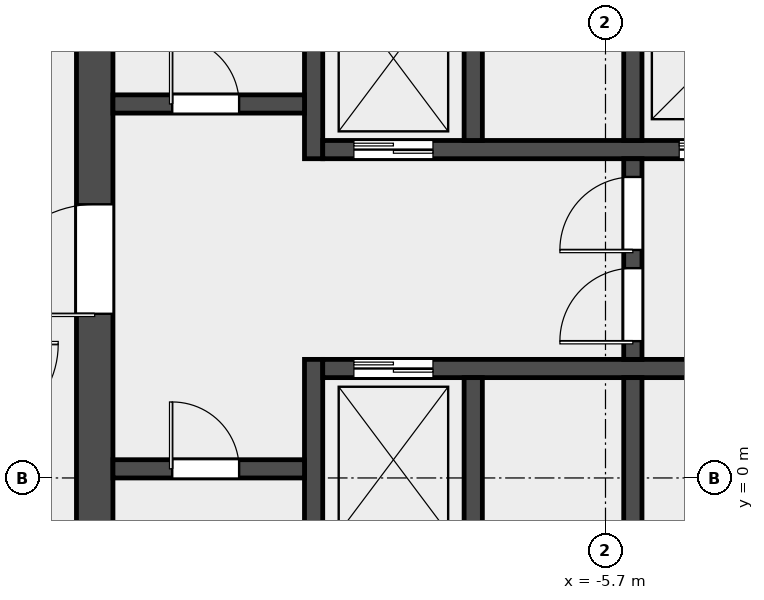
"""IFC4 building model, lengths in metres.
Left out: names, types, materials, properties, quantities, classifications, styles, units other than length and angle.
Written with IfcOpenShell. Run it as: python <this file> out.ifc"""

import sys

from ifc_helpers import new_model, si_unit, direction, frame, frame_2d, origin, place, context, subcontext, project, spatial, rectangle, extrude, element, fill, save


model = new_model("IFC4")
c1 = context("Model", 3, precision=1e-05, world=origin(), true_north=direction((0.0, 1.0)))
c2 = subcontext(c1, "Body", "Model", "MODEL_VIEW")
j1 = project(units=[si_unit("LENGTHUNIT", "METRE"), si_unit("PLANEANGLEUNIT", "RADIAN")], contexts=[c1])
p1 = place(None, origin())
s1 = spatial("IfcSite", under=j1, at=p1, CompositionType="ELEMENT")
p2 = place(p1, origin())
s2 = spatial("IfcBuilding", under=s1, at=p2, CompositionType="ELEMENT")
p3 = place(p2, frame((0.0, 0.0, 307.4)))
s3 = spatial("IfcBuildingStorey", under=s2, at=p3, CompositionType="ELEMENT", Elevation=307.4)
p4 = place(p3, frame((-14.1, -6.6, 0.0), z_axis=(0.0, 0.0, 1.0), x_axis=(0.0, 1.0, 0.0)))
e1 = element("IfcWall", 1, at=p4, inside=s3, PredefinedType="SHEAR", context=c2, shape_type="SweptSolid", body=[
    extrude(rectangle(XDim=19.5, YDim=0.6, at=frame_2d((9.75, 0.0))), origin(), (0.0, 0.0, 1.0), 3.7),
])
p5 = place(p4, frame((9.3, 0.0, 0.0)))
e2 = element("IfcOpeningElement", 2, at=p5, cuts=e1, PredefinedType="OPENING", context=c2, shape_type="SweptSolid", body=[
    extrude(rectangle(XDim=1.8, YDim=2.1, at=frame_2d((0.9, 1.05))), frame((0.0, 0.312, 0.0), z_axis=(0.0, -1.0, 0.0), x_axis=(1.0, 0.0, 0.0)), (0.0, 0.0, 1.0), 0.624),
])
p6 = place(p3, frame((-10.5, -6.6, 0.0), z_axis=(0.0, 0.0, 1.0), x_axis=(0.0, 1.0, 0.0)))
e3 = element("IfcWall", 3, at=p6, inside=s3, PredefinedType="SHEAR", context=c2, shape_type="SweptSolid", body=[
    extrude(rectangle(XDim=8.55, YDim=0.3, at=frame_2d((4.275, 0.0))), origin(), (0.0, 0.0, 1.0), 3.7),
])
p7 = place(p3, frame((-10.5, 5.25, 0.0), z_axis=(0.0, 0.0, 1.0), x_axis=(0.0, 1.0, 0.0)))
e4 = element("IfcWall", 4, at=p7, inside=s3, PredefinedType="SHEAR", context=c2, shape_type="SweptSolid", body=[
    extrude(rectangle(XDim=7.65, YDim=0.3, at=frame_2d((3.825, 0.0))), origin(), (0.0, 0.0, 1.0), 3.7),
])
p8 = place(p3, frame((-13.8, 0.15, 0.0), z_axis=(0.0, 0.0, 1.0), x_axis=(1.0, 0.0, 0.0)))
e5 = element("IfcWall", 5, at=p8, inside=s3, PredefinedType="SOLIDWALL", context=c2, shape_type="SweptSolid", body=[
    extrude(rectangle(XDim=3.15, YDim=0.3, at=frame_2d((1.575, 0.0))), origin(), (0.0, 0.0, 1.0), 3.7),
])
p9 = place(p8, frame((0.975, 0.0, 0.0)))
e6 = element("IfcOpeningElement", 6, at=p9, cuts=e5, PredefinedType="OPENING", context=c2, shape_type="SweptSolid", body=[
    extrude(rectangle(XDim=1.1, YDim=2.1, at=frame_2d((0.55, 1.05))), frame((0.0, 0.162, 0.0), z_axis=(0.0, -1.0, 0.0), x_axis=(1.0, 0.0, 0.0)), (0.0, 0.0, 1.0), 0.324),
])
p10 = place(p3, frame((-13.8, 6.15, 0.0), z_axis=(0.0, 0.0, 1.0), x_axis=(1.0, 0.0, 0.0)))
e7 = element("IfcWall", 7, at=p10, inside=s3, PredefinedType="SOLIDWALL", context=c2, shape_type="SweptSolid", body=[
    extrude(rectangle(XDim=3.15, YDim=0.3, at=frame_2d((1.575, 0.0))), origin(), (0.0, 0.0, 1.0), 3.7),
])
p11 = place(p10, frame((0.975, 0.0, 0.0)))
e8 = element("IfcOpeningElement", 8, at=p11, cuts=e7, PredefinedType="OPENING", context=c2, shape_type="SweptSolid", body=[
    extrude(rectangle(XDim=1.1, YDim=2.1, at=frame_2d((0.55, 1.05))), frame((0.0, 0.162, 0.0), z_axis=(0.0, -1.0, 0.0), x_axis=(1.0, 0.0, 0.0)), (0.0, 0.0, 1.0), 0.324),
])
p12 = place(p3, frame((-10.35, 1.8, 0.0), z_axis=(0.0, 0.0, 1.0), x_axis=(1.0, 0.0, 0.0)))
e9 = element("IfcWall", 9, at=p12, inside=s3, PredefinedType="SOLIDWALL", context=c2, shape_type="SweptSolid", body=[
    extrude(rectangle(XDim=20.7, YDim=0.3, at=frame_2d((10.35, 0.0))), origin(), (0.0, 0.0, 1.0), 3.7),
])
p13 = place(p12, frame((0.512, 0.0, 0.0)))
e10 = element("IfcOpeningElement", 10, at=p13, cuts=e9, PredefinedType="OPENING", context=c2, shape_type="SweptSolid", body=[
    extrude(rectangle(XDim=1.3, YDim=2.1, at=frame_2d((0.65, 1.05))), frame((0.0, 0.162, 0.0), z_axis=(0.0, -1.0, 0.0), x_axis=(1.0, 0.0, 0.0)), (0.0, 0.0, 1.0), 0.324),
])
p14 = place(p12, frame((7.225, 0.0, 0.0)))
e11 = element("IfcOpeningElement", 11, at=p14, cuts=e9, PredefinedType="OPENING", context=c2, shape_type="SweptSolid", body=[
    extrude(rectangle(XDim=1.0, YDim=2.1, at=frame_2d((0.5, 1.05))), frame((0.0, 0.162, 0.0), z_axis=(0.0, -1.0, 0.0), x_axis=(1.0, 0.0, 0.0)), (0.0, 0.0, 1.0), 0.324),
])
p15 = place(p12, frame((11.163, 0.0, 0.0)))
e12 = element("IfcOpeningElement", 12, at=p15, cuts=e9, PredefinedType="OPENING", context=c2, shape_type="SweptSolid", body=[
    extrude(rectangle(XDim=1.0, YDim=2.1, at=frame_2d((0.5, 1.05))), frame((0.0, 0.162, 0.0), z_axis=(0.0, -1.0, 0.0), x_axis=(1.0, 0.0, 0.0)), (0.0, 0.0, 1.0), 0.324),
])
p16 = place(p12, frame((16.413, 0.0, 0.0)))
e13 = element("IfcOpeningElement", 13, at=p16, cuts=e9, PredefinedType="OPENING", context=c2, shape_type="SweptSolid", body=[
    extrude(rectangle(XDim=1.0, YDim=2.1, at=frame_2d((0.5, 1.05))), frame((0.0, 0.162, 0.0), z_axis=(0.0, -1.0, 0.0), x_axis=(1.0, 0.0, 0.0)), (0.0, 0.0, 1.0), 0.324),
])
p17 = place(p3, frame((-10.35, 5.4, 0.0), z_axis=(0.0, 0.0, 1.0), x_axis=(1.0, 0.0, 0.0)))
e14 = element("IfcWall", 14, at=p17, inside=s3, PredefinedType="SOLIDWALL", context=c2, shape_type="SweptSolid", body=[
    extrude(rectangle(XDim=20.7, YDim=0.3, at=frame_2d((10.35, 0.0))), origin(), (0.0, 0.0, 1.0), 3.7),
])
p18 = place(p17, frame((0.512, 0.0, 0.0)))
e15 = element("IfcOpeningElement", 15, at=p18, cuts=e14, PredefinedType="OPENING", context=c2, shape_type="SweptSolid", body=[
    extrude(rectangle(XDim=1.3, YDim=2.1, at=frame_2d((0.65, 1.05))), frame((0.0, 0.162, 0.0), z_axis=(0.0, -1.0, 0.0), x_axis=(1.0, 0.0, 0.0)), (0.0, 0.0, 1.0), 0.324),
])
p19 = place(p17, frame((5.863, 0.0, 0.0)))
e16 = element("IfcOpeningElement", 16, at=p19, cuts=e14, PredefinedType="OPENING", context=c2, shape_type="SweptSolid", body=[
    extrude(rectangle(XDim=1.1, YDim=2.1, at=frame_2d((0.55, 1.05))), frame((0.0, 0.162, 0.0), z_axis=(0.0, -1.0, 0.0), x_axis=(1.0, 0.0, 0.0)), (0.0, 0.0, 1.0), 0.324),
])
p20 = place(p17, frame((8.488, 0.0, 0.0)))
e17 = element("IfcOpeningElement", 17, at=p20, cuts=e14, PredefinedType="OPENING", context=c2, shape_type="SweptSolid", body=[
    extrude(rectangle(XDim=1.1, YDim=2.1, at=frame_2d((0.55, 1.05))), frame((0.0, 0.162, 0.0), z_axis=(0.0, -1.0, 0.0), x_axis=(1.0, 0.0, 0.0)), (0.0, 0.0, 1.0), 0.324),
])
p21 = place(p17, frame((11.113, 0.0, 0.0)))
e18 = element("IfcOpeningElement", 18, at=p21, cuts=e14, PredefinedType="OPENING", context=c2, shape_type="SweptSolid", body=[
    extrude(rectangle(XDim=1.1, YDim=2.1, at=frame_2d((0.55, 1.05))), frame((0.0, 0.162, 0.0), z_axis=(0.0, -1.0, 0.0), x_axis=(1.0, 0.0, 0.0)), (0.0, 0.0, 1.0), 0.324),
])
p22 = place(p17, frame((13.738, 0.0, 0.0)))
e19 = element("IfcOpeningElement", 19, at=p22, cuts=e14, PredefinedType="OPENING", context=c2, shape_type="SweptSolid", body=[
    extrude(rectangle(XDim=1.1, YDim=2.1, at=frame_2d((0.55, 1.05))), frame((0.0, 0.162, 0.0), z_axis=(0.0, -1.0, 0.0), x_axis=(1.0, 0.0, 0.0)), (0.0, 0.0, 1.0), 0.324),
])
p23 = place(p17, frame((16.363, 0.0, 0.0)))
e20 = element("IfcOpeningElement", 20, at=p23, cuts=e14, PredefinedType="OPENING", context=c2, shape_type="SweptSolid", body=[
    extrude(rectangle(XDim=1.1, YDim=2.1, at=frame_2d((0.55, 1.05))), frame((0.0, 0.162, 0.0), z_axis=(0.0, -1.0, 0.0), x_axis=(1.0, 0.0, 0.0)), (0.0, 0.0, 1.0), 0.324),
])
p24 = place(p17, frame((18.988, 0.0, 0.0)))
e21 = element("IfcOpeningElement", 21, at=p24, cuts=e14, PredefinedType="OPENING", context=c2, shape_type="SweptSolid", body=[
    extrude(rectangle(XDim=1.1, YDim=2.1, at=frame_2d((0.55, 1.05))), frame((0.0, 0.162, 0.0), z_axis=(0.0, -1.0, 0.0), x_axis=(1.0, 0.0, 0.0)), (0.0, 0.0, 1.0), 0.324),
])
for number, where, z_axis, x_axis in (
    (22, (-7.875, -1.05, 0.0), (0.0, 0.0, 1.0), (0.0, 1.0, 0.0)),
    (23, (-5.25, -1.05, 0.0), (0.0, 0.0, 1.0), (0.0, 1.0, 0.0)),
    (24, (-7.875, 5.55, 0.0), (0.0, 0.0, 1.0), (0.0, 1.0, 0.0)),
    (25, (-5.25, 5.55, 0.0), (0.0, 0.0, 1.0), (0.0, 1.0, 0.0)),
):
    element("IfcWall", number, at=place(p3, frame(where, z_axis=z_axis, x_axis=x_axis)), inside=s3, PredefinedType="SOLIDWALL", context=c2, shape_type="SweptSolid", body=[
        extrude(rectangle(XDim=2.7, YDim=0.3, at=frame_2d((1.35, 0.0))), origin(), (0.0, 0.0, 1.0), 3.7),
    ])
p25 = place(p3, frame((-5.25, 1.95, 0.0), z_axis=(0.0, 0.0, 1.0), x_axis=(0.0, 1.0, 0.0)))
e26 = element("IfcWall", 26, at=p25, inside=s3, PredefinedType="SOLIDWALL", context=c2, shape_type="SweptSolid", body=[
    extrude(rectangle(XDim=3.3, YDim=0.3, at=frame_2d((1.65, 0.0))), origin(), (0.0, 0.0, 1.0), 3.7),
])
p26 = place(p25, frame((0.3, 0.0, 0.0)))
e27 = element("IfcOpeningElement", 27, at=p26, cuts=e26, PredefinedType="OPENING", context=c2, shape_type="SweptSolid", body=[
    extrude(rectangle(XDim=1.2, YDim=2.1, at=frame_2d((0.6, 1.05))), frame((0.0, 0.162, 0.0), z_axis=(0.0, -1.0, 0.0), x_axis=(1.0, 0.0, 0.0)), (0.0, 0.0, 1.0), 0.324),
])
p27 = place(p25, frame((1.8, 0.0, 0.0)))
e28 = element("IfcOpeningElement", 28, at=p27, cuts=e26, PredefinedType="OPENING", context=c2, shape_type="SweptSolid", body=[
    extrude(rectangle(XDim=1.2, YDim=2.1, at=frame_2d((0.6, 1.05))), frame((0.0, 0.162, 0.0), z_axis=(0.0, -1.0, 0.0), x_axis=(1.0, 0.0, 0.0)), (0.0, 0.0, 1.0), 0.324),
])
p28 = place(p9, origin())
e29 = element("IfcDoor", 29, at=p28, inside=s3, OperationType="SINGLE_SWING_LEFT", PredefinedType="DOOR", context=c2, shape_type="SweptSolid", body=[
    extrude(rectangle(XDim=1.1, YDim=2.1, at=frame_2d((0.55, 1.05))), frame((0.0, 0.025, 0.0), z_axis=(0.0, -1.0, 0.0), x_axis=(1.0, 0.0, 0.0)), (0.0, 0.0, 1.0), 0.05),
])
fill(e6, e29)
p29 = place(p11, origin())
e30 = element("IfcDoor", 30, at=p29, inside=s3, OperationType="SINGLE_SWING_LEFT", PredefinedType="DOOR", context=c2, shape_type="SweptSolid", body=[
    extrude(rectangle(XDim=1.1, YDim=2.1, at=frame_2d((0.55, 1.05))), frame((0.0, 0.025, 0.0), z_axis=(0.0, -1.0, 0.0), x_axis=(1.0, 0.0, 0.0)), (0.0, 0.0, 1.0), 0.05),
])
fill(e8, e30)
p30 = place(p5, origin())
e31 = element("IfcDoor", 31, at=p30, inside=s3, OperationType="DOUBLE_DOOR_SINGLE_SWING", PredefinedType="DOOR", context=c2, shape_type="SweptSolid", body=[
    extrude(rectangle(XDim=1.8, YDim=2.1, at=frame_2d((0.9, 1.05))), frame((0.0, 0.025, 0.0), z_axis=(0.0, -1.0, 0.0), x_axis=(1.0, 0.0, 0.0)), (0.0, 0.0, 1.0), 0.05),
])
fill(e2, e31)
p31 = place(p26, origin())
e32 = element("IfcDoor", 32, at=p31, inside=s3, OperationType="SINGLE_SWING_LEFT", PredefinedType="DOOR", context=c2, shape_type="SweptSolid", body=[
    extrude(rectangle(XDim=1.2, YDim=2.1, at=frame_2d((0.6, 1.05))), frame((0.0, 0.025, 0.0), z_axis=(0.0, -1.0, 0.0), x_axis=(1.0, 0.0, 0.0)), (0.0, 0.0, 1.0), 0.05),
])
fill(e27, e32)
p32 = place(p27, origin())
e33 = element("IfcDoor", 33, at=p32, inside=s3, OperationType="SINGLE_SWING_RIGHT", PredefinedType="DOOR", context=c2, shape_type="SweptSolid", body=[
    extrude(rectangle(XDim=1.2, YDim=2.1, at=frame_2d((0.6, 1.05))), frame((0.0, 0.025, 0.0), z_axis=(0.0, -1.0, 0.0), x_axis=(1.0, 0.0, 0.0)), (0.0, 0.0, 1.0), 0.05),
])
fill(e28, e33)
p33 = place(p13, origin())
e34 = element("IfcDoor", 34, at=p33, inside=s3, OperationType="DOUBLE_DOOR_SLIDING", PredefinedType="DOOR", context=c2, shape_type="SweptSolid", body=[
    extrude(rectangle(XDim=1.3, YDim=2.1, at=frame_2d((0.65, 1.05))), frame((0.0, 0.025, 0.0), z_axis=(0.0, -1.0, 0.0), x_axis=(1.0, 0.0, 0.0)), (0.0, 0.0, 1.0), 0.05),
])
fill(e10, e34)
p34 = place(p18, origin())
e35 = element("IfcDoor", 35, at=p34, inside=s3, OperationType="DOUBLE_DOOR_SLIDING", PredefinedType="DOOR", context=c2, shape_type="SweptSolid", body=[
    extrude(rectangle(XDim=1.3, YDim=2.1, at=frame_2d((0.65, 1.05))), frame((0.0, 0.025, 0.0), z_axis=(0.0, -1.0, 0.0), x_axis=(1.0, 0.0, 0.0)), (0.0, 0.0, 1.0), 0.05),
])
fill(e15, e35)
p35 = place(p19, origin())
e36 = element("IfcDoor", 36, at=p35, inside=s3, OperationType="DOUBLE_DOOR_SLIDING", PredefinedType="DOOR", context=c2, shape_type="SweptSolid", body=[
    extrude(rectangle(XDim=1.1, YDim=2.1, at=frame_2d((0.55, 1.05))), frame((0.0, 0.025, 0.0), z_axis=(0.0, -1.0, 0.0), x_axis=(1.0, 0.0, 0.0)), (0.0, 0.0, 1.0), 0.05),
])
fill(e16, e36)
save(model, sys.argv[1])
